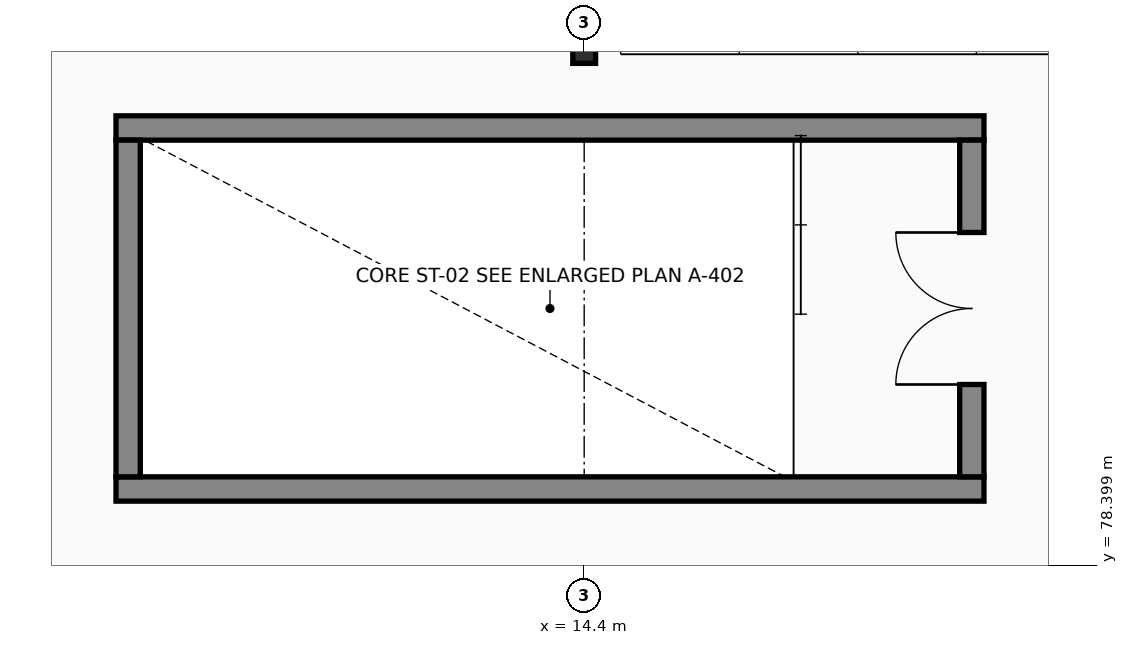
"""IFC4 building model, lengths in metres.
Left out: names, types, materials, properties, quantities, classifications, styles, units other than length and angle.
Written with IfcOpenShell. Run it as: python <this file> out.ifc"""

import sys

from ifc_helpers import new_model, si_unit, direction, frame, frame_2d, origin, origin_2d, place, context, subcontext, project, spatial, rectangle, i_section, extrude, element, fill, save


model = new_model("IFC4")
c1 = context("Model", 3, precision=1e-05, world=origin(), true_north=direction((0.0, 1.0)))
c2 = subcontext(c1, "Body", "Model", "MODEL_VIEW")
j1 = project(units=[si_unit("LENGTHUNIT", "METRE"), si_unit("PLANEANGLEUNIT", "RADIAN")], contexts=[c1])
p1 = place(None, origin())
s1 = spatial("IfcSite", under=j1, at=p1, CompositionType="ELEMENT")
p2 = place(p1, origin())
s2 = spatial("IfcBuilding", under=s1, at=p2, CompositionType="ELEMENT")
p3 = place(p2, frame((0.0, 0.0, 14.4)))
s3 = spatial("IfcBuildingStorey", under=s2, at=p3, CompositionType="ELEMENT", Elevation=14.4)
p4 = place(p3, frame((14.4, 85.2, 0.0), z_axis=(0.0, 0.0, 1.0), x_axis=(1.0, 0.0, 0.0)))
e1 = element("IfcColumn", 1, at=p4, inside=s3, PredefinedType="COLUMN", context=c2, shape_type="SweptSolid", body=[
    extrude(i_section(OverallWidth=0.3, OverallDepth=0.4, WebThickness=0.013, FlangeThickness=0.024, at=origin_2d()), origin(), (0.0, 0.0, 1.0), 4.8),
])
for number, where, z_axis, x_axis in (
    (2, (8.24, 79.4, 0.0), (0.0, 0.0, 1.0), (1.0, 0.0, 0.0)),
    (3, (8.24, 84.15, 0.0), (0.0, 0.0, 1.0), (1.0, 0.0, 0.0)),
):
    element("IfcWall", number, at=place(p3, frame(where, z_axis=z_axis, x_axis=x_axis)), inside=s3, PredefinedType="SHEAR", context=c2, shape_type="SweptSolid", body=[
        extrude(rectangle(XDim=11.42, YDim=0.32, at=frame_2d((5.71, 0.0))), origin(), (0.0, 0.0, 1.0), 4.0),
    ])
p5 = place(p3, frame((8.4, 79.56, 0.0), z_axis=(0.0, 0.0, 1.0), x_axis=(0.0, 1.0, 0.0)))
e4 = element("IfcWall", 4, at=p5, inside=s3, PredefinedType="SHEAR", context=c2, shape_type="SweptSolid", body=[
    extrude(rectangle(XDim=4.43, YDim=0.32, at=frame_2d((2.215, 0.0))), origin(), (0.0, 0.0, 1.0), 4.0),
])
p6 = place(p3, frame((19.5, 79.56, 0.0), z_axis=(0.0, 0.0, 1.0), x_axis=(0.0, 1.0, 0.0)))
e5 = element("IfcWall", 5, at=p6, inside=s3, PredefinedType="SHEAR", context=c2, shape_type="SweptSolid", body=[
    extrude(rectangle(XDim=4.43, YDim=0.32, at=frame_2d((2.215, 0.0))), origin(), (0.0, 0.0, 1.0), 4.0),
])
p7 = place(p6, frame((1.215, 0.0, 0.0)))
e6 = element("IfcOpeningElement", 6, at=p7, cuts=e5, PredefinedType="OPENING", context=c2, shape_type="SweptSolid", body=[
    extrude(rectangle(XDim=2.0, YDim=2.15, at=frame_2d((1.0, 1.075))), frame((0.0, 0.17, 0.0), z_axis=(0.0, -1.0, 0.0), x_axis=(1.0, 0.0, 0.0)), (0.0, 0.0, 1.0), 0.34),
])
p8 = place(p7, origin())
e7 = element("IfcDoor", 7, at=p8, inside=s3, OperationType="DOUBLE_DOOR_SINGLE_SWING", PredefinedType="DOOR", context=c2, shape_type="SweptSolid", body=[
    extrude(rectangle(XDim=2.0, YDim=2.15, at=frame_2d((1.0, 1.075))), frame((0.0, 0.025, 0.0), z_axis=(0.0, -1.0, 0.0), x_axis=(1.0, 0.0, 0.0)), (0.0, 0.0, 1.0), 0.05),
])
fill(e6, e7)
save(model, sys.argv[1])
